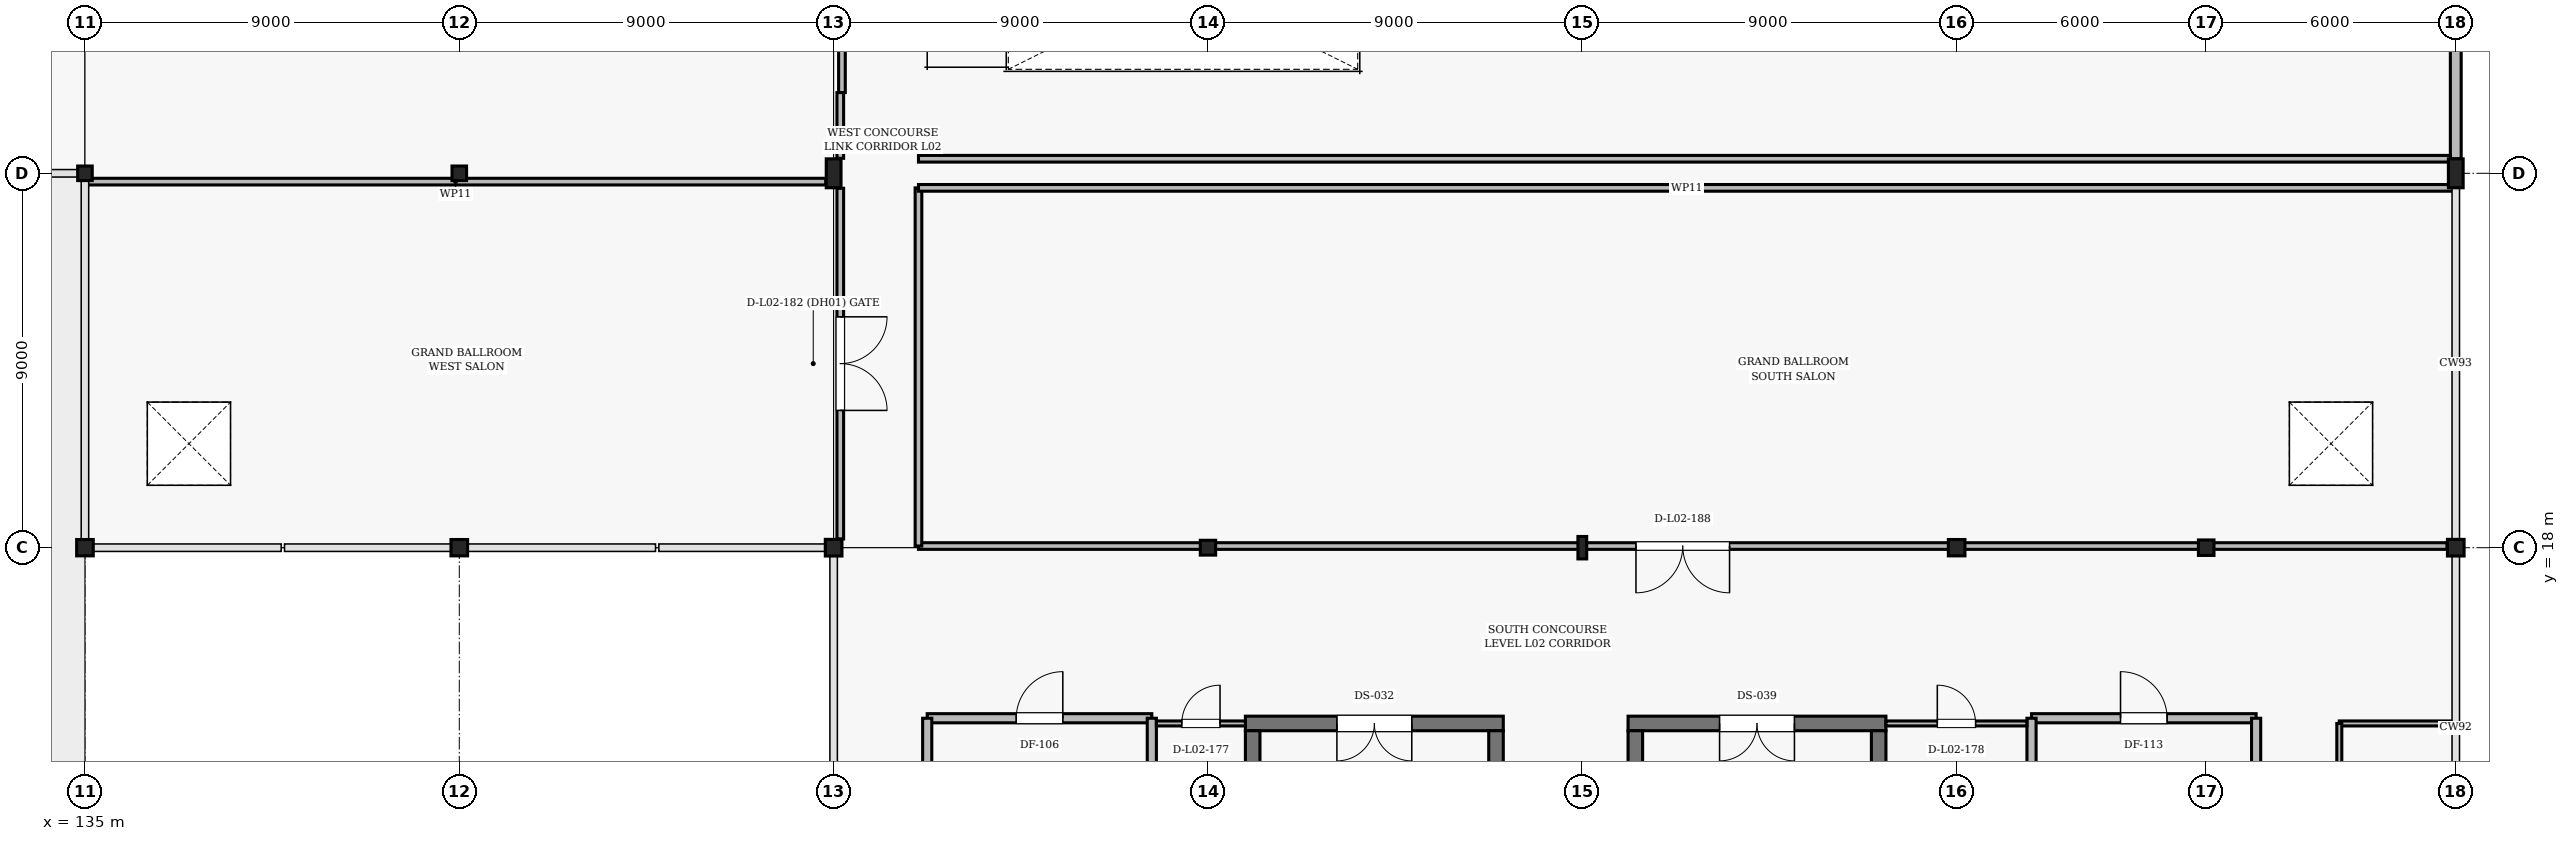
"""IFC4 building model, lengths in metres.
Left out: names, types, materials, properties, quantities, classifications, styles, units other than length and angle.
Written with IfcOpenShell. Run it as: python <this file> out.ifc"""

import sys

from ifc_helpers import new_model, si_unit, direction, frame, frame_2d, origin, origin_2d, place, context, subcontext, project, spatial, rectangle, hollow_rectangle, i_section, extrude, element, fill, save


model = new_model("IFC4")
c1 = context("Model", 3, precision=1e-05, world=origin(), true_north=direction((0.0, 1.0)))
c2 = subcontext(c1, "Body", "Model", "MODEL_VIEW")
j1 = project(units=[si_unit("LENGTHUNIT", "METRE"), si_unit("PLANEANGLEUNIT", "RADIAN")], contexts=[c1])
p1 = place(None, origin())
s1 = spatial("IfcSite", under=j1, at=p1, CompositionType="ELEMENT")
p2 = place(p1, origin())
s2 = spatial("IfcBuilding", under=s1, at=p2, CompositionType="ELEMENT")
p3 = place(p2, frame((0.0, 0.0, 10.8)))
s3 = spatial("IfcBuildingStorey", under=s2, at=p3, CompositionType="ELEMENT", Elevation=10.8)
p4 = place(p3, frame((135.0, 18.0, 0.0), z_axis=(0.0, 0.0, 1.0), x_axis=(1.0, 0.0, 0.0)))
e1 = element("IfcColumn", 1, at=p4, inside=s3, PredefinedType="COLUMN", context=c2, shape_type="SweptSolid", body=[
    extrude(i_section(OverallWidth=0.399, OverallDepth=0.393, WebThickness=0.023, FlangeThickness=0.037, FilletRadius=0.018, at=origin_2d()), origin(), (0.0, 0.0, 1.0), 4.625),
])
p5 = place(p3, frame((135.0, 27.0, 0.0), z_axis=(0.0, 0.0, 1.0), x_axis=(1.0, 0.0, 0.0)))
e2 = element("IfcColumn", 2, at=p5, inside=s3, PredefinedType="COLUMN", context=c2, shape_type="SweptSolid", body=[
    extrude(hollow_rectangle(XDim=0.35, YDim=0.35, WallThickness=0.012, InnerFilletRadius=0.012, OuterFilletRadius=0.025, at=origin_2d()), origin(), (0.0, 0.0, 1.0), 4.8),
])
p6 = place(p3, frame((144.0, 18.0, 0.0), z_axis=(0.0, 0.0, 1.0), x_axis=(1.0, 0.0, 0.0)))
e3 = element("IfcColumn", 3, at=p6, inside=s3, PredefinedType="COLUMN", context=c2, shape_type="SweptSolid", body=[
    extrude(i_section(OverallWidth=0.399, OverallDepth=0.393, WebThickness=0.023, FlangeThickness=0.037, FilletRadius=0.018, at=origin_2d()), origin(), (0.0, 0.0, 1.0), 4.625),
])
p7 = place(p3, frame((144.0, 27.0, 0.0), z_axis=(0.0, 0.0, 1.0), x_axis=(1.0, 0.0, 0.0)))
e4 = element("IfcColumn", 4, at=p7, inside=s3, PredefinedType="COLUMN", context=c2, shape_type="SweptSolid", body=[
    extrude(hollow_rectangle(XDim=0.35, YDim=0.35, WallThickness=0.012, InnerFilletRadius=0.012, OuterFilletRadius=0.025, at=origin_2d()), origin(), (0.0, 0.0, 1.0), 4.8),
])
p8 = place(p3, frame((153.0, 18.0, 0.0), z_axis=(0.0, 0.0, 1.0), x_axis=(1.0, 0.0, 0.0)))
e5 = element("IfcColumn", 5, at=p8, inside=s3, PredefinedType="COLUMN", context=c2, shape_type="SweptSolid", body=[
    extrude(hollow_rectangle(XDim=0.4, YDim=0.4, WallThickness=0.016, InnerFilletRadius=0.016, OuterFilletRadius=0.032, at=origin_2d()), origin(), (0.0, 0.0, 1.0), 4.8),
])
p9 = place(p3, frame((153.0, 27.0, 0.0), z_axis=(0.0, 0.0, 1.0), x_axis=(1.0, 0.0, 0.0)))
e6 = element("IfcColumn", 6, at=p9, inside=s3, PredefinedType="COLUMN", context=c2, shape_type="SweptSolid", body=[
    extrude(i_section(OverallWidth=0.355, OverallDepth=0.695, WebThickness=0.015, FlangeThickness=0.025, FilletRadius=0.018, at=origin_2d()), origin(), (0.0, 0.0, 1.0), 4.8),
])
p10 = place(p3, frame((162.0, 18.0, 0.0), z_axis=(0.0, 0.0, 1.0), x_axis=(1.0, 0.0, 0.0)))
e7 = element("IfcColumn", 7, at=p10, inside=s3, PredefinedType="COLUMN", context=c2, shape_type="SweptSolid", body=[
    extrude(i_section(OverallWidth=0.369, OverallDepth=0.356, WebThickness=0.011, FlangeThickness=0.018, FilletRadius=0.015, at=origin_2d()), origin(), (0.0, 0.0, 1.0), 4.8),
])
p11 = place(p3, frame((171.0, 18.0, 0.0), z_axis=(0.0, 0.0, 1.0), x_axis=(1.0, 0.0, 0.0)))
e8 = element("IfcColumn", 8, at=p11, inside=s3, PredefinedType="COLUMN", context=c2, shape_type="SweptSolid", body=[
    extrude(i_section(OverallWidth=0.211, OverallDepth=0.539, WebThickness=0.012, FlangeThickness=0.019, FilletRadius=0.014, at=origin_2d()), origin(), (0.0, 0.0, 1.0), 4.8),
])
p12 = place(p3, frame((180.0, 18.0, 0.0), z_axis=(0.0, 0.0, 1.0), x_axis=(1.0, 0.0, 0.0)))
e9 = element("IfcColumn", 9, at=p12, inside=s3, PredefinedType="COLUMN", context=c2, shape_type="SweptSolid", body=[
    extrude(i_section(OverallWidth=0.399, OverallDepth=0.393, WebThickness=0.023, FlangeThickness=0.037, FilletRadius=0.018, at=origin_2d()), origin(), (0.0, 0.0, 1.0), 4.8),
])
p13 = place(p3, frame((186.0, 18.0, 0.0), z_axis=(0.0, 0.0, 1.0), x_axis=(1.0, 0.0, 0.0)))
e10 = element("IfcColumn", 10, at=p13, inside=s3, PredefinedType="COLUMN", context=c2, shape_type="SweptSolid", body=[
    extrude(i_section(OverallWidth=0.374, OverallDepth=0.372, WebThickness=0.016, FlangeThickness=0.026, FilletRadius=0.016, at=origin_2d()), origin(), (0.0, 0.0, 1.0), 4.8),
])
p14 = place(p3, frame((192.0, 18.0, 0.0), z_axis=(0.0, 0.0, 1.0), x_axis=(1.0, 0.0, 0.0)))
e11 = element("IfcColumn", 11, at=p14, inside=s3, PredefinedType="COLUMN", context=c2, shape_type="SweptSolid", body=[
    extrude(hollow_rectangle(XDim=0.4, YDim=0.4, WallThickness=0.016, InnerFilletRadius=0.016, OuterFilletRadius=0.032, at=origin_2d()), origin(), (0.0, 0.0, 1.0), 4.8),
])
p15 = place(p3, frame((192.0, 27.0, 0.0), z_axis=(0.0, 0.0, 1.0), x_axis=(1.0, 0.0, 0.0)))
e12 = element("IfcColumn", 12, at=p15, inside=s3, PredefinedType="COLUMN", context=c2, shape_type="SweptSolid", body=[
    extrude(i_section(OverallWidth=0.355, OverallDepth=0.695, WebThickness=0.015, FlangeThickness=0.025, FilletRadius=0.018, at=origin_2d()), origin(), (0.0, 0.0, 1.0), 4.8),
])
p16 = place(p3, frame((192.0, 35.788, 0.0), z_axis=(0.0, 0.0, 1.0), x_axis=(0.0, -1.0, 0.0)))
e13 = element("IfcWall", 13, at=p16, inside=s3, PredefinedType="SOLIDWALL", context=c2, shape_type="SweptSolid", body=[
    extrude(rectangle(XDim=8.44, YDim=0.26, at=frame_2d((4.22, 0.0))), origin(), (0.0, 0.0, 1.0), 4.285),
])
p17 = place(p16, frame((1.485, 0.0, 0.95)))
e14 = element("IfcOpeningElement", 14, at=p17, cuts=e13, PredefinedType="OPENING", context=c2, shape_type="SweptSolid", body=[
    extrude(rectangle(XDim=2.45, YDim=1.9, at=frame_2d((1.225, 0.95))), frame((0.0, 0.14, 0.0), z_axis=(0.0, -1.0, 0.0), x_axis=(1.0, 0.0, 0.0)), (0.0, 0.0, 1.0), 0.28),
])
p18 = place(p3, frame((169.1, 13.775, 0.0), z_axis=(0.0, 0.0, 1.0), x_axis=(-1.0, 0.0, 0.0)))
e15 = element("IfcWall", 15, at=p18, inside=s3, PredefinedType="SHEAR", context=c2, shape_type="SweptSolid", body=[
    extrude(rectangle(XDim=6.2, YDim=0.35, at=frame_2d((3.1, 0.0))), origin(), (0.0, 0.0, 1.0), 4.6),
])
p19 = place(p18, frame((2.2, 0.0, 0.0)))
e16 = element("IfcOpeningElement", 16, at=p19, cuts=e15, PredefinedType="OPENING", context=c2, shape_type="SweptSolid", body=[
    extrude(rectangle(XDim=1.8, YDim=2.2, at=frame_2d((0.9, 1.1))), frame((0.0, 0.185, 0.0), z_axis=(0.0, -1.0, 0.0), x_axis=(1.0, 0.0, 0.0)), (0.0, 0.0, 1.0), 0.37),
])
for number, where, z_axis, x_axis in (
    (17, (163.075, 13.6, 0.0), (0.0, 0.0, 1.0), (0.0, -1.0, 0.0)),
    (18, (168.925, 2.2, 0.0), (0.0, 0.0, 1.0), (0.0, 1.0, 0.0)),
):
    element("IfcWall", number, at=place(p3, frame(where, z_axis=z_axis, x_axis=x_axis)), inside=s3, PredefinedType="SHEAR", context=c2, shape_type="SweptSolid", body=[
        extrude(rectangle(XDim=11.4, YDim=0.35, at=frame_2d((5.7, 0.0))), origin(), (0.0, 0.0, 1.0), 4.6),
    ])
p20 = place(p3, frame((178.3, 13.775, 0.0), z_axis=(0.0, 0.0, 1.0), x_axis=(-1.0, 0.0, 0.0)))
e19 = element("IfcWall", 19, at=p20, inside=s3, PredefinedType="SHEAR", context=c2, shape_type="SweptSolid", body=[
    extrude(rectangle(XDim=6.2, YDim=0.35, at=frame_2d((3.1, 0.0))), origin(), (0.0, 0.0, 1.0), 4.6),
])
p21 = place(p20, frame((2.2, 0.0, 0.0)))
e20 = element("IfcOpeningElement", 20, at=p21, cuts=e19, PredefinedType="OPENING", context=c2, shape_type="SweptSolid", body=[
    extrude(rectangle(XDim=1.8, YDim=2.2, at=frame_2d((0.9, 1.1))), frame((0.0, 0.185, 0.0), z_axis=(0.0, -1.0, 0.0), x_axis=(1.0, 0.0, 0.0)), (0.0, 0.0, 1.0), 0.37),
])
for number, where, z_axis, x_axis in (
    (21, (172.275, 13.6, 0.0), (0.0, 0.0, 1.0), (0.0, -1.0, 0.0)),
    (22, (178.125, 2.2, 0.0), (0.0, 0.0, 1.0), (0.0, 1.0, 0.0)),
):
    element("IfcWall", number, at=place(p3, frame(where, z_axis=z_axis, x_axis=x_axis)), inside=s3, PredefinedType="SHEAR", context=c2, shape_type="SweptSolid", body=[
        extrude(rectangle(XDim=11.4, YDim=0.35, at=frame_2d((5.7, 0.0))), origin(), (0.0, 0.0, 1.0), 4.6),
    ])
p22 = place(p3, frame((155.25, 13.9, 0.0), z_axis=(0.0, 0.0, 1.0), x_axis=(1.0, 0.0, 0.0)))
e23 = element("IfcWall", 23, at=p22, inside=s3, PredefinedType="SOLIDWALL", context=c2, shape_type="SweptSolid", body=[
    extrude(rectangle(XDim=5.4, YDim=0.22, at=frame_2d((2.7, 0.0))), origin(), (0.0, 0.0, 1.0), 4.6),
])
p23 = place(p22, frame((2.14, 0.0, 0.0)))
e24 = element("IfcOpeningElement", 24, at=p23, cuts=e23, PredefinedType="OPENING", context=c2, shape_type="SweptSolid", body=[
    extrude(rectangle(XDim=1.12, YDim=2.2, at=frame_2d((0.56, 1.1))), frame((0.0, 0.12, 0.0), z_axis=(0.0, -1.0, 0.0), x_axis=(1.0, 0.0, 0.0)), (0.0, 0.0, 1.0), 0.24),
])
for number, where, z_axis, x_axis in (
    (25, (155.25, 10.85, 0.0), (0.0, 0.0, 1.0), (0.0, 1.0, 0.0)),
    (26, (160.65, 10.85, 0.0), (0.0, 0.0, 1.0), (0.0, 1.0, 0.0)),
):
    element("IfcWall", number, at=place(p3, frame(where, z_axis=z_axis, x_axis=x_axis)), inside=s3, PredefinedType="SOLIDWALL", context=c2, shape_type="SweptSolid", body=[
        extrude(rectangle(XDim=3.05, YDim=0.22, at=frame_2d((1.525, 0.0))), origin(), (0.0, 0.0, 1.0), 4.6),
    ])
p24 = place(p3, frame((181.8, 13.9, 0.0), z_axis=(0.0, 0.0, 1.0), x_axis=(1.0, 0.0, 0.0)))
e27 = element("IfcWall", 27, at=p24, inside=s3, PredefinedType="SOLIDWALL", context=c2, shape_type="SweptSolid", body=[
    extrude(rectangle(XDim=5.4, YDim=0.22, at=frame_2d((2.7, 0.0))), origin(), (0.0, 0.0, 1.0), 4.6),
])
p25 = place(p24, frame((2.14, 0.0, 0.0)))
e28 = element("IfcOpeningElement", 28, at=p25, cuts=e27, PredefinedType="OPENING", context=c2, shape_type="SweptSolid", body=[
    extrude(rectangle(XDim=1.12, YDim=2.2, at=frame_2d((0.56, 1.1))), frame((0.0, 0.12, 0.0), z_axis=(0.0, -1.0, 0.0), x_axis=(1.0, 0.0, 0.0)), (0.0, 0.0, 1.0), 0.24),
])
for number, where, z_axis, x_axis in (
    (29, (181.8, 10.85, 0.0), (0.0, 0.0, 1.0), (0.0, 1.0, 0.0)),
    (30, (187.2, 10.85, 0.0), (0.0, 0.0, 1.0), (0.0, 1.0, 0.0)),
):
    element("IfcWall", number, at=place(p3, frame(where, z_axis=z_axis, x_axis=x_axis)), inside=s3, PredefinedType="SOLIDWALL", context=c2, shape_type="SweptSolid", body=[
        extrude(rectangle(XDim=3.05, YDim=0.22, at=frame_2d((1.525, 0.0))), origin(), (0.0, 0.0, 1.0), 4.6),
    ])
p26 = place(p3, frame((160.76, 13.775, 0.0), z_axis=(0.0, 0.0, 1.0), x_axis=(1.0, 0.0, 0.0)))
e31 = element("IfcWall", 31, at=p26, inside=s3, PredefinedType="PARTITIONING", context=c2, shape_type="SweptSolid", body=[
    extrude(rectangle(XDim=2.14, YDim=0.12, at=frame_2d((1.07, 0.0))), origin(), (0.0, 0.0, 1.0), 3.89),
])
p27 = place(p26, frame((0.61, 0.0, 0.0)))
e32 = element("IfcOpeningElement", 32, at=p27, cuts=e31, PredefinedType="OPENING", context=c2, shape_type="SweptSolid", body=[
    extrude(rectangle(XDim=0.92, YDim=2.12, at=frame_2d((0.46, 1.06))), frame((0.0, 0.07, 0.0), z_axis=(0.0, -1.0, 0.0), x_axis=(1.0, 0.0, 0.0)), (0.0, 0.0, 1.0), 0.14),
])
p28 = place(p3, frame((178.3, 13.775, 0.0), z_axis=(0.0, 0.0, 1.0), x_axis=(1.0, 0.0, 0.0)))
e33 = element("IfcWall", 33, at=p28, inside=s3, PredefinedType="PARTITIONING", context=c2, shape_type="SweptSolid", body=[
    extrude(rectangle(XDim=3.39, YDim=0.12, at=frame_2d((1.695, 0.0))), origin(), (0.0, 0.0, 1.0), 3.812),
])
p29 = place(p28, frame((1.235, 0.0, 0.0)))
e34 = element("IfcOpeningElement", 34, at=p29, cuts=e33, PredefinedType="OPENING", context=c2, shape_type="SweptSolid", body=[
    extrude(rectangle(XDim=0.92, YDim=2.12, at=frame_2d((0.46, 1.06))), frame((0.0, 0.07, 0.0), z_axis=(0.0, -1.0, 0.0), x_axis=(1.0, 0.0, 0.0)), (0.0, 0.0, 1.0), 0.14),
])
p30 = place(p3, frame((189.2, 13.775, 0.0), z_axis=(0.0, 0.0, 1.0), x_axis=(1.0, 0.0, 0.0)))
e35 = element("IfcWall", 35, at=p30, inside=s3, PredefinedType="PARTITIONING", context=c2, shape_type="SweptSolid", body=[
    extrude(rectangle(XDim=2.788, YDim=0.12, at=frame_2d((1.394, 0.0))), origin(), (0.0, 0.0, 1.0), 4.046),
])
p31 = place(p3, frame((189.2, 9.65, 0.0), z_axis=(0.0, 0.0, 1.0), x_axis=(0.0, 1.0, 0.0)))
e36 = element("IfcWall", 36, at=p31, inside=s3, PredefinedType="PARTITIONING", context=c2, shape_type="SweptSolid", body=[
    extrude(rectangle(XDim=4.125, YDim=0.12, at=frame_2d((2.062, 0.0))), origin(), (0.0, 0.0, 1.0), 4.6),
])
p32 = place(p31, frame((1.552, 0.0, 0.0)))
e37 = element("IfcOpeningElement", 37, at=p32, cuts=e36, PredefinedType="OPENING", context=c2, shape_type="SweptSolid", body=[
    extrude(rectangle(XDim=1.02, YDim=2.16, at=frame_2d((0.51, 1.08))), frame((0.0, 0.07, 0.0), z_axis=(0.0, -1.0, 0.0), x_axis=(1.0, 0.0, 0.0)), (0.0, 0.0, 1.0), 0.14),
])
p33 = place(p3, frame((135.012, 26.8, 0.0), z_axis=(0.0, 0.0, 1.0), x_axis=(1.0, 0.0, 0.0)))
e38 = element("IfcWall", 38, at=p33, inside=s3, PredefinedType="PARTITIONING", context=c2, shape_type="SweptSolid", body=[
    extrude(rectangle(XDim=17.798, YDim=0.16, at=frame_2d((8.899, 0.0))), origin(), (0.0, 0.0, 1.0), 3.673),
])
p34 = place(p3, frame((153.16, 26.64, 0.0), z_axis=(0.0, 0.0, 1.0), x_axis=(0.0, -1.0, 0.0)))
e39 = element("IfcWall", 39, at=p34, inside=s3, PredefinedType="PARTITIONING", context=c2, shape_type="SweptSolid", body=[
    extrude(rectangle(XDim=8.43, YDim=0.16, at=frame_2d((4.215, 0.0))), origin(), (0.0, 0.0, 1.0), 3.673),
])
p35 = place(p34, frame((3.09, 0.0, 0.0)))
e40 = element("IfcOpeningElement", 40, at=p35, cuts=e39, PredefinedType="OPENING", context=c2, shape_type="SweptSolid", body=[
    extrude(rectangle(XDim=2.25, YDim=2.4, at=frame_2d((1.125, 1.2))), frame((0.0, 0.09, 0.0), z_axis=(0.0, -1.0, 0.0), x_axis=(1.0, 0.0, 0.0)), (0.0, 0.0, 1.0), 0.18),
])
p36 = place(p3, frame((191.79, 18.04, 0.0), z_axis=(0.0, 0.0, 1.0), x_axis=(-1.0, 0.0, 0.0)))
e41 = element("IfcWall", 41, at=p36, inside=s3, PredefinedType="PARTITIONING", context=c2, shape_type="SweptSolid", body=[
    extrude(rectangle(XDim=36.75, YDim=0.16, at=frame_2d((18.375, 0.0))), origin(), (0.0, 0.0, 1.0), 3.73),
])
p37 = place(p36, frame((17.25, 0.0, 0.0)))
e42 = element("IfcOpeningElement", 42, at=p37, cuts=e41, PredefinedType="OPENING", context=c2, shape_type="SweptSolid", body=[
    extrude(rectangle(XDim=2.25, YDim=2.4, at=frame_2d((1.125, 1.2))), frame((0.0, 0.09, 0.0), z_axis=(0.0, -1.0, 0.0), x_axis=(1.0, 0.0, 0.0)), (0.0, 0.0, 1.0), 0.18),
])
p38 = place(p3, frame((155.04, 18.04, 0.0), z_axis=(0.0, 0.0, 1.0), x_axis=(0.0, 1.0, 0.0)))
e43 = element("IfcWall", 43, at=p38, inside=s3, PredefinedType="PARTITIONING", context=c2, shape_type="SweptSolid", body=[
    extrude(rectangle(XDim=8.61, YDim=0.16, at=frame_2d((4.305, 0.0))), origin(), (0.0, 0.0, 1.0), 3.673),
])
p39 = place(p3, frame((155.04, 26.65, 0.0), z_axis=(0.0, 0.0, 1.0), x_axis=(1.0, 0.0, 0.0)))
e44 = element("IfcWall", 44, at=p39, inside=s3, PredefinedType="PARTITIONING", context=c2, shape_type="SweptSolid", body=[
    extrude(rectangle(XDim=36.948, YDim=0.16, at=frame_2d((18.474, 0.0))), origin(), (0.0, 0.0, 1.0), 3.673),
])
p40 = place(p3, frame((153.2, 44.44, 0.0), z_axis=(0.0, 0.0, 1.0), x_axis=(0.0, -1.0, 0.0)))
e45 = element("IfcWall", 45, at=p40, inside=s3, PredefinedType="PARTITIONING", context=c2, shape_type="SweptSolid", body=[
    extrude(rectangle(XDim=15.5, YDim=0.16, at=frame_2d((7.75, 0.0))), origin(), (0.0, 0.0, 1.0), 2.585),
])
p41 = place(p40, frame((4.3, 0.0, 0.0)))
e46 = element("IfcOpeningElement", 46, at=p41, cuts=e45, PredefinedType="OPENING", context=c2, shape_type="SweptSolid", body=[
    extrude(rectangle(XDim=2.25, YDim=2.38, at=frame_2d((1.125, 1.19))), frame((0.0, 0.09, 0.0), z_axis=(0.0, -1.0, 0.0), x_axis=(1.0, 0.0, 0.0)), (0.0, 0.0, 1.0), 0.18),
])
p42 = place(p3, frame((153.16, 28.94, 0.0), z_axis=(0.0, 0.0, 1.0), x_axis=(0.0, -1.0, 0.0)))
e47 = element("IfcWall", 47, at=p42, inside=s3, PredefinedType="PARTITIONING", context=c2, shape_type="SweptSolid", body=[
    extrude(rectangle(XDim=1.58, YDim=0.16, at=frame_2d((0.79, 0.0))), origin(), (0.0, 0.0, 1.0), 3.673),
])
p43 = place(p3, frame((191.87, 27.35, 0.0), z_axis=(0.0, 0.0, 1.0), x_axis=(-1.0, 0.0, 0.0)))
e48 = element("IfcWall", 48, at=p43, inside=s3, PredefinedType="PARTITIONING", context=c2, shape_type="SweptSolid", body=[
    extrude(rectangle(XDim=36.83, YDim=0.16, at=frame_2d((18.415, 0.0))), origin(), (0.0, 0.0, 1.0), 3.673),
])
p44 = place(p19, origin())
e49 = element("IfcDoor", 49, at=p44, inside=s3, OperationType="DOUBLE_DOOR_SINGLE_SWING", PredefinedType="DOOR", context=c2, shape_type="SweptSolid", body=[
    extrude(rectangle(XDim=1.8, YDim=2.2, at=frame_2d((0.9, 1.1))), frame((0.0, 0.025, 0.0), z_axis=(0.0, -1.0, 0.0), x_axis=(1.0, 0.0, 0.0)), (0.0, 0.0, 1.0), 0.05),
])
fill(e16, e49)
p45 = place(p21, origin())
e50 = element("IfcDoor", 50, at=p45, inside=s3, OperationType="DOUBLE_DOOR_SINGLE_SWING", PredefinedType="DOOR", context=c2, shape_type="SweptSolid", body=[
    extrude(rectangle(XDim=1.8, YDim=2.2, at=frame_2d((0.9, 1.1))), frame((0.0, 0.025, 0.0), z_axis=(0.0, -1.0, 0.0), x_axis=(1.0, 0.0, 0.0)), (0.0, 0.0, 1.0), 0.05),
])
fill(e20, e50)
p46 = place(p23, origin())
e51 = element("IfcDoor", 51, at=p46, inside=s3, OperationType="SINGLE_SWING_RIGHT", PredefinedType="DOOR", context=c2, shape_type="SweptSolid", body=[
    extrude(rectangle(XDim=1.12, YDim=2.2, at=frame_2d((0.56, 1.1))), frame((0.0, 0.025, 0.0), z_axis=(0.0, -1.0, 0.0), x_axis=(1.0, 0.0, 0.0)), (0.0, 0.0, 1.0), 0.05),
])
fill(e24, e51)
p47 = place(p25, origin())
e52 = element("IfcDoor", 52, at=p47, inside=s3, OperationType="SINGLE_SWING_LEFT", PredefinedType="DOOR", context=c2, shape_type="SweptSolid", body=[
    extrude(rectangle(XDim=1.12, YDim=2.2, at=frame_2d((0.56, 1.1))), frame((0.0, 0.025, 0.0), z_axis=(0.0, -1.0, 0.0), x_axis=(1.0, 0.0, 0.0)), (0.0, 0.0, 1.0), 0.05),
])
fill(e28, e52)
p48 = place(p27, origin())
e53 = element("IfcDoor", 53, at=p48, inside=s3, OperationType="SINGLE_SWING_RIGHT", PredefinedType="DOOR", context=c2, shape_type="SweptSolid", body=[
    extrude(rectangle(XDim=0.92, YDim=2.12, at=frame_2d((0.46, 1.06))), frame((0.0, 0.025, 0.0), z_axis=(0.0, -1.0, 0.0), x_axis=(1.0, 0.0, 0.0)), (0.0, 0.0, 1.0), 0.05),
])
fill(e32, e53)
p49 = place(p29, origin())
e54 = element("IfcDoor", 54, at=p49, inside=s3, OperationType="SINGLE_SWING_LEFT", PredefinedType="DOOR", context=c2, shape_type="SweptSolid", body=[
    extrude(rectangle(XDim=0.92, YDim=2.12, at=frame_2d((0.46, 1.06))), frame((0.0, 0.025, 0.0), z_axis=(0.0, -1.0, 0.0), x_axis=(1.0, 0.0, 0.0)), (0.0, 0.0, 1.0), 0.05),
])
fill(e34, e54)
p50 = place(p35, origin())
e55 = element("IfcDoor", 55, at=p50, inside=s3, OperationType="DOUBLE_DOOR_SINGLE_SWING", PredefinedType="DOOR", context=c2, shape_type="SweptSolid", body=[
    extrude(rectangle(XDim=2.25, YDim=2.4, at=frame_2d((1.125, 1.2))), frame((0.0, 0.025, 0.0), z_axis=(0.0, -1.0, 0.0), x_axis=(1.0, 0.0, 0.0)), (0.0, 0.0, 1.0), 0.05),
])
fill(e40, e55)
p51 = place(p37, origin())
e56 = element("IfcDoor", 56, at=p51, inside=s3, OperationType="DOUBLE_DOOR_SINGLE_SWING", PredefinedType="DOOR", context=c2, shape_type="SweptSolid", body=[
    extrude(rectangle(XDim=2.25, YDim=2.4, at=frame_2d((1.125, 1.2))), frame((0.0, 0.025, 0.0), z_axis=(0.0, -1.0, 0.0), x_axis=(1.0, 0.0, 0.0)), (0.0, 0.0, 1.0), 0.05),
])
fill(e42, e56)
save(model, sys.argv[1])
